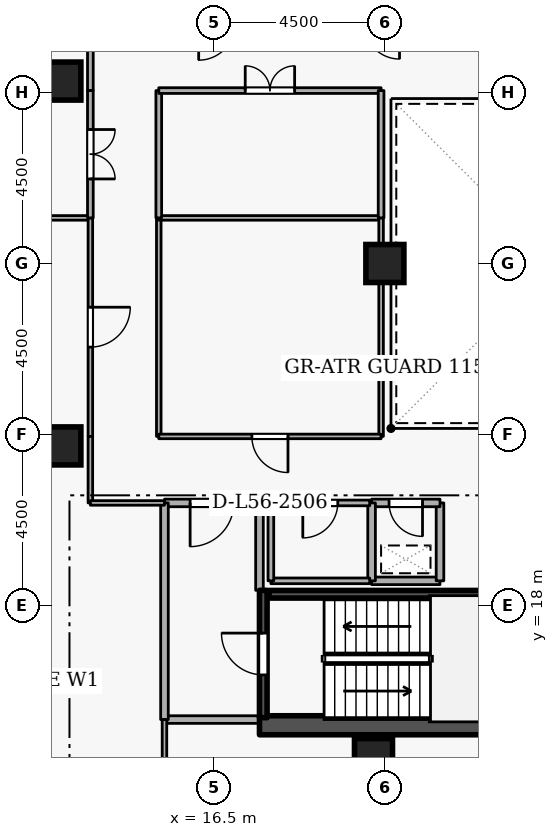
"""IFC4 building model, lengths in metres.
Left out: names, types, materials, properties, quantities, classifications, styles, units other than length and angle.
Written with IfcOpenShell. Run it as: python <this file> out.ifc"""

import sys

from ifc_helpers import new_model, si_unit, direction, frame, frame_2d, origin, origin_2d, place, context, subcontext, project, spatial, rectangle, extrude, element, fill, save


model = new_model("IFC4")
c1 = context("Model", 3, precision=1e-05, world=origin(), true_north=direction((0.0, 1.0)))
c2 = subcontext(c1, "Body", "Model", "MODEL_VIEW")
j1 = project(units=[si_unit("LENGTHUNIT", "METRE"), si_unit("PLANEANGLEUNIT", "RADIAN")], contexts=[c1])
p1 = place(None, origin())
s1 = spatial("IfcSite", under=j1, at=p1, CompositionType="ELEMENT")
p2 = place(p1, origin())
s2 = spatial("IfcBuilding", under=s1, at=p2, CompositionType="ELEMENT")
p3 = place(p2, frame((0.0, 0.0, 210.9)))
s3 = spatial("IfcBuildingStorey", under=s2, at=p3, CompositionType="ELEMENT", Elevation=210.9)
p4 = place(p3, frame((17.7, 14.85, 0.0), z_axis=(0.0, 0.0, 1.0), x_axis=(1.0, 0.0, 0.0)))
e1 = element("IfcWall", 1, at=p4, inside=s3, PredefinedType="SHEAR", context=c2, shape_type="SweptSolid", body=[
    extrude(rectangle(XDim=15.6, YDim=0.5, at=frame_2d((7.8, 0.0))), origin(), (0.0, 0.0, 1.0), 3.6),
])
for number, where, z_axis, x_axis in (
    (2, (12.5, 22.2, 0.0), (0.0, 0.0, 1.0), (1.0, 0.0, 0.0)),
    (3, (12.5, 31.8, 0.0), (0.0, 0.0, 1.0), (1.0, 0.0, 0.0)),
    (4, (20.7, 14.0, 0.0), (0.0, 0.0, 1.0), (1.0, 0.0, 0.0)),
    (5, (21.0, 27.0, 0.0), (0.0, 0.0, 1.0), (1.0, 0.0, 0.0)),
):
    element("IfcColumn", number, at=place(p3, frame(where, z_axis=z_axis, x_axis=x_axis)), inside=s3, PredefinedType="COLUMN", context=c2, shape_type="SweptSolid", body=[
        extrude(rectangle(XDim=1.0, YDim=1.0, at=origin_2d()), origin(), (0.0, 0.0, 1.0), 3.6),
    ])
p5 = place(p3, frame((17.8, 15.05, 0.0), z_axis=(0.0, 0.0, 1.0), x_axis=(0.0, 1.0, 0.0)))
e6 = element("IfcWall", 6, at=p5, inside=s3, PredefinedType="SHEAR", context=c2, shape_type="SweptSolid", body=[
    extrude(rectangle(XDim=3.35, YDim=0.2, at=frame_2d((1.675, 0.0))), origin(), (0.0, 0.0, 1.0), 3.6),
])
p6 = place(p5, frame((1.125, 0.0, 0.0)))
e7 = element("IfcOpeningElement", 7, at=p6, cuts=e6, PredefinedType="OPENING", context=c2, shape_type="SweptSolid", body=[
    extrude(rectangle(XDim=1.1, YDim=2.1, at=frame_2d((0.55, 1.05))), frame((0.0, 0.11, 0.0), z_axis=(0.0, -1.0, 0.0), x_axis=(1.0, 0.0, 0.0)), (0.0, 0.0, 1.0), 0.22),
])
p7 = place(p3, frame((25.05, 18.297, 0.0), z_axis=(0.0, 0.0, 1.0), x_axis=(-1.0, 0.0, 0.0)))
e8 = element("IfcWall", 8, at=p7, inside=s3, PredefinedType="SHEAR", context=c2, shape_type="SweptSolid", body=[
    extrude(rectangle(XDim=7.1, YDim=0.2, at=frame_2d((3.55, 0.0))), origin(), (0.0, 0.0, 1.0), 3.6),
])
p8 = place(p3, frame((15.2, 15.0, 0.0), z_axis=(0.0, 0.0, 1.0), x_axis=(1.0, 0.0, 0.0)))
e9 = element("IfcWall", 9, at=p8, inside=s3, PredefinedType="STANDARD", context=c2, shape_type="SweptSolid", body=[
    extrude(rectangle(XDim=2.5, YDim=0.2, at=frame_2d((1.25, 0.0))), origin(), (0.0, 0.0, 1.0), 3.34),
])
p9 = place(p3, frame((17.7, 18.4, 0.0), z_axis=(0.0, 0.0, 1.0), x_axis=(0.0, 1.0, 0.0)))
e10 = element("IfcWall", 10, at=p9, inside=s3, PredefinedType="STANDARD", context=c2, shape_type="SweptSolid", body=[
    extrude(rectangle(XDim=2.3, YDim=0.2, at=frame_2d((1.15, 0.0))), origin(), (0.0, 0.0, 1.0), 2.545),
])
p10 = place(p3, frame((17.7, 20.7, 0.0), z_axis=(0.0, 0.0, 1.0), x_axis=(-1.0, 0.0, 0.0)))
e11 = element("IfcWall", 11, at=p10, inside=s3, PredefinedType="STANDARD", context=c2, shape_type="SweptSolid", body=[
    extrude(rectangle(XDim=2.5, YDim=0.2, at=frame_2d((1.25, 0.0))), origin(), (0.0, 0.0, 1.0), 3.34),
])
p11 = place(p10, frame((0.675, 0.0, 0.0)))
e12 = element("IfcOpeningElement", 12, at=p11, cuts=e11, PredefinedType="OPENING", context=c2, shape_type="SweptSolid", body=[
    extrude(rectangle(XDim=1.15, YDim=2.1, at=frame_2d((0.575, 1.05))), frame((0.0, 0.11, 0.0), z_axis=(0.0, -1.0, 0.0), x_axis=(1.0, 0.0, 0.0)), (0.0, 0.0, 1.0), 0.22),
])
p12 = place(p3, frame((15.2, 20.7, 0.0), z_axis=(0.0, 0.0, 1.0), x_axis=(0.0, -1.0, 0.0)))
e13 = element("IfcWall", 13, at=p12, inside=s3, PredefinedType="STANDARD", context=c2, shape_type="SweptSolid", body=[
    extrude(rectangle(XDim=5.7, YDim=0.2, at=frame_2d((2.85, 0.0))), origin(), (0.0, 0.0, 1.0), 3.34),
])
p13 = place(p3, frame((20.65, 18.65, 0.0), z_axis=(0.0, 0.0, 1.0), x_axis=(1.0, 0.0, 0.0)))
e14 = element("IfcWall", 14, at=p13, inside=s3, PredefinedType="STANDARD", context=c2, shape_type="SweptSolid", body=[
    extrude(rectangle(XDim=1.8, YDim=0.2, at=frame_2d((0.9, 0.0))), origin(), (0.0, 0.0, 1.0), 3.34),
])
p14 = place(p3, frame((22.45, 18.65, 0.0), z_axis=(0.0, 0.0, 1.0), x_axis=(0.0, 1.0, 0.0)))
e15 = element("IfcWall", 15, at=p14, inside=s3, PredefinedType="STANDARD", context=c2, shape_type="SweptSolid", body=[
    extrude(rectangle(XDim=2.05, YDim=0.2, at=frame_2d((1.025, 0.0))), origin(), (0.0, 0.0, 1.0), 3.34),
])
p15 = place(p3, frame((22.45, 20.7, 0.0), z_axis=(0.0, 0.0, 1.0), x_axis=(-1.0, 0.0, 0.0)))
e16 = element("IfcWall", 16, at=p15, inside=s3, PredefinedType="STANDARD", context=c2, shape_type="SweptSolid", body=[
    extrude(rectangle(XDim=1.8, YDim=0.2, at=frame_2d((0.9, 0.0))), origin(), (0.0, 0.0, 1.0), 3.34),
])
p16 = place(p15, frame((0.46, 0.0, 0.0)))
e17 = element("IfcOpeningElement", 17, at=p16, cuts=e16, PredefinedType="OPENING", context=c2, shape_type="SweptSolid", body=[
    extrude(rectangle(XDim=0.88, YDim=2.04, at=frame_2d((0.44, 1.02))), frame((0.0, 0.11, 0.0), z_axis=(0.0, -1.0, 0.0), x_axis=(1.0, 0.0, 0.0)), (0.0, 0.0, 1.0), 0.22),
])
p17 = place(p3, frame((20.65, 20.7, 0.0), z_axis=(0.0, 0.0, 1.0), x_axis=(0.0, -1.0, 0.0)))
e18 = element("IfcWall", 18, at=p17, inside=s3, PredefinedType="STANDARD", context=c2, shape_type="SweptSolid", body=[
    extrude(rectangle(XDim=2.05, YDim=0.2, at=frame_2d((1.025, 0.0))), origin(), (0.0, 0.0, 1.0), 3.34),
])
p18 = place(p3, frame((18.0, 18.65, 0.0), z_axis=(0.0, 0.0, 1.0), x_axis=(1.0, 0.0, 0.0)))
e19 = element("IfcWall", 19, at=p18, inside=s3, PredefinedType="PARTITIONING", context=c2, shape_type="SweptSolid", body=[
    extrude(rectangle(XDim=2.6, YDim=0.15, at=frame_2d((1.3, 0.0))), origin(), (0.0, 0.0, 1.0), 3.34),
])
p19 = place(p3, frame((20.6, 20.7, 0.0), z_axis=(0.0, 0.0, 1.0), x_axis=(-1.0, 0.0, 0.0)))
e20 = element("IfcWall", 20, at=p19, inside=s3, PredefinedType="PARTITIONING", context=c2, shape_type="SweptSolid", body=[
    extrude(rectangle(XDim=2.6, YDim=0.15, at=frame_2d((1.3, 0.0))), origin(), (0.0, 0.0, 1.0), 3.34),
])
p20 = place(p19, frame((0.84, 0.0, 0.0)))
e21 = element("IfcOpeningElement", 21, at=p20, cuts=e20, PredefinedType="OPENING", context=c2, shape_type="SweptSolid", body=[
    extrude(rectangle(XDim=0.92, YDim=2.08, at=frame_2d((0.46, 1.04))), frame((0.0, 0.085, 0.0), z_axis=(0.0, -1.0, 0.0), x_axis=(1.0, 0.0, 0.0)), (0.0, 0.0, 1.0), 0.17),
])
p21 = place(p3, frame((18.0, 20.7, 0.0), z_axis=(0.0, 0.0, 1.0), x_axis=(0.0, -1.0, 0.0)))
e22 = element("IfcWall", 22, at=p21, inside=s3, PredefinedType="PARTITIONING", context=c2, shape_type="SweptSolid", body=[
    extrude(rectangle(XDim=2.05, YDim=0.15, at=frame_2d((1.025, 0.0))), origin(), (0.0, 0.0, 1.0), 2.545),
])
p22 = place(p3, frame((1.78, 28.2, 0.0), z_axis=(0.0, 0.0, 1.0), x_axis=(1.0, 0.0, 0.0)))
e23 = element("IfcWall", 23, at=p22, inside=s3, PredefinedType="PARTITIONING", context=c2, shape_type="SweptSolid", body=[
    extrude(rectangle(XDim=11.47, YDim=0.12, at=frame_2d((5.735, 0.0))), origin(), (0.0, 0.0, 1.0), 3.34),
])
p23 = place(p3, frame((13.25, 28.2, 0.0), z_axis=(0.0, 0.0, 1.0), x_axis=(0.0, -1.0, 0.0)))
e24 = element("IfcWall", 24, at=p23, inside=s3, PredefinedType="PARTITIONING", context=c2, shape_type="SweptSolid", body=[
    extrude(rectangle(XDim=5.75, YDim=0.12, at=frame_2d((2.875, 0.0))), origin(), (0.0, 0.0, 1.0), 3.34),
])
p24 = place(p23, frame((2.35, 0.0, 0.0)))
e25 = element("IfcOpeningElement", 25, at=p24, cuts=e24, PredefinedType="OPENING", context=c2, shape_type="SweptSolid", body=[
    extrude(rectangle(XDim=1.05, YDim=2.1, at=frame_2d((0.525, 1.05))), frame((0.0, 0.07, 0.0), z_axis=(0.0, -1.0, 0.0), x_axis=(1.0, 0.0, 0.0)), (0.0, 0.0, 1.0), 0.14),
])
p25 = place(p3, frame((13.25, 22.45, 0.0), z_axis=(0.0, 0.0, 1.0), x_axis=(0.0, -1.0, 0.0)))
e26 = element("IfcWall", 26, at=p25, inside=s3, PredefinedType="PARTITIONING", context=c2, shape_type="SweptSolid", body=[
    extrude(rectangle(XDim=1.75, YDim=0.12, at=frame_2d((0.875, 0.0))), origin(), (0.0, 0.0, 1.0), 3.34),
])
p26 = place(p3, frame((13.25, 20.7, 0.0), z_axis=(0.0, 0.0, 1.0), x_axis=(1.0, 0.0, 0.0)))
e27 = element("IfcWall", 27, at=p26, inside=s3, PredefinedType="PARTITIONING", context=c2, shape_type="SweptSolid", body=[
    extrude(rectangle(XDim=1.95, YDim=0.12, at=frame_2d((0.975, 0.0))), origin(), (0.0, 0.0, 1.0), 3.34),
])
p27 = place(p3, frame((15.2, 15.0, 0.0), z_axis=(0.0, 0.0, 1.0), x_axis=(0.0, -1.0, 0.0)))
e28 = element("IfcWall", 28, at=p27, inside=s3, PredefinedType="PARTITIONING", context=c2, shape_type="SweptSolid", body=[
    extrude(rectangle(XDim=5.72, YDim=0.12, at=frame_2d((2.86, 0.0))), origin(), (0.0, 0.0, 1.0), 3.34),
])
p28 = place(p3, frame((13.25, 33.3, 0.0), z_axis=(0.0, 0.0, 1.0), x_axis=(0.0, -1.0, 0.0)))
e29 = element("IfcWall", 29, at=p28, inside=s3, PredefinedType="PARTITIONING", context=c2, shape_type="SweptSolid", body=[
    extrude(rectangle(XDim=1.75, YDim=0.15, at=frame_2d((0.875, 0.0))), origin(), (0.0, 0.0, 1.0), 3.34),
])
p29 = place(p3, frame((13.25, 31.55, 0.0), z_axis=(0.0, 0.0, 1.0), x_axis=(0.0, -1.0, 0.0)))
e30 = element("IfcWall", 30, at=p29, inside=s3, PredefinedType="PARTITIONING", context=c2, shape_type="SweptSolid", body=[
    extrude(rectangle(XDim=3.35, YDim=0.15, at=frame_2d((1.675, 0.0))), origin(), (0.0, 0.0, 1.0), 3.34),
])
p30 = place(p29, frame((1.025, 0.0, 0.0)))
e31 = element("IfcOpeningElement", 31, at=p30, cuts=e30, PredefinedType="OPENING", context=c2, shape_type="SweptSolid", body=[
    extrude(rectangle(XDim=1.3, YDim=2.12, at=frame_2d((0.65, 1.06))), frame((0.0, 0.085, 0.0), z_axis=(0.0, -1.0, 0.0), x_axis=(1.0, 0.0, 0.0)), (0.0, 0.0, 1.0), 0.17),
])
p31 = place(p3, frame((15.05, 22.45, 0.0), z_axis=(0.0, 0.0, 1.0), x_axis=(0.0, 1.0, 0.0)))
e32 = element("IfcWall", 32, at=p31, inside=s3, PredefinedType="PARTITIONING", context=c2, shape_type="SweptSolid", body=[
    extrude(rectangle(XDim=5.75, YDim=0.12, at=frame_2d((2.875, 0.0))), origin(), (0.0, 0.0, 1.0), 3.34),
])
p32 = place(p3, frame((15.05, 28.2, 0.0), z_axis=(0.0, 0.0, 1.0), x_axis=(1.0, 0.0, 0.0)))
e33 = element("IfcWall", 33, at=p32, inside=s3, PredefinedType="PARTITIONING", context=c2, shape_type="SweptSolid", body=[
    extrude(rectangle(XDim=5.85, YDim=0.12, at=frame_2d((2.925, 0.0))), origin(), (0.0, 0.0, 1.0), 3.34),
])
p33 = place(p3, frame((20.9, 28.2, 0.0), z_axis=(0.0, 0.0, 1.0), x_axis=(0.0, -1.0, 0.0)))
e34 = element("IfcWall", 34, at=p33, inside=s3, PredefinedType="PARTITIONING", context=c2, shape_type="SweptSolid", body=[
    extrude(rectangle(XDim=5.75, YDim=0.12, at=frame_2d((2.875, 0.0))), origin(), (0.0, 0.0, 1.0), 3.34),
])
p34 = place(p3, frame((20.9, 22.45, 0.0), z_axis=(0.0, 0.0, 1.0), x_axis=(-1.0, 0.0, 0.0)))
e35 = element("IfcWall", 35, at=p34, inside=s3, PredefinedType="PARTITIONING", context=c2, shape_type="SweptSolid", body=[
    extrude(rectangle(XDim=5.85, YDim=0.12, at=frame_2d((2.925, 0.0))), origin(), (0.0, 0.0, 1.0), 3.34),
])
p35 = place(p34, frame((2.45, 0.0, 0.0)))
e36 = element("IfcOpeningElement", 36, at=p35, cuts=e35, PredefinedType="OPENING", context=c2, shape_type="SweptSolid", body=[
    extrude(rectangle(XDim=0.95, YDim=2.1, at=frame_2d((0.475, 1.05))), frame((0.0, 0.07, 0.0), z_axis=(0.0, -1.0, 0.0), x_axis=(1.0, 0.0, 0.0)), (0.0, 0.0, 1.0), 0.14),
])
p36 = place(p3, frame((15.05, 28.2, 0.0), z_axis=(0.0, 0.0, 1.0), x_axis=(0.0, 1.0, 0.0)))
e37 = element("IfcWall", 37, at=p36, inside=s3, PredefinedType="PARTITIONING", context=c2, shape_type="SweptSolid", body=[
    extrude(rectangle(XDim=3.35, YDim=0.15, at=frame_2d((1.675, 0.0))), origin(), (0.0, 0.0, 1.0), 3.34),
])
p37 = place(p3, frame((15.05, 31.55, 0.0), z_axis=(0.0, 0.0, 1.0), x_axis=(1.0, 0.0, 0.0)))
e38 = element("IfcWall", 38, at=p37, inside=s3, PredefinedType="PARTITIONING", context=c2, shape_type="SweptSolid", body=[
    extrude(rectangle(XDim=5.85, YDim=0.15, at=frame_2d((2.925, 0.0))), origin(), (0.0, 0.0, 1.0), 3.34),
])
p38 = place(p37, frame((2.275, 0.0, 0.0)))
e39 = element("IfcOpeningElement", 39, at=p38, cuts=e38, PredefinedType="OPENING", context=c2, shape_type="SweptSolid", body=[
    extrude(rectangle(XDim=1.3, YDim=2.12, at=frame_2d((0.65, 1.06))), frame((0.0, 0.085, 0.0), z_axis=(0.0, -1.0, 0.0), x_axis=(1.0, 0.0, 0.0)), (0.0, 0.0, 1.0), 0.17),
])
p39 = place(p3, frame((20.9, 31.55, 0.0), z_axis=(0.0, 0.0, 1.0), x_axis=(0.0, -1.0, 0.0)))
e40 = element("IfcWall", 40, at=p39, inside=s3, PredefinedType="PARTITIONING", context=c2, shape_type="SweptSolid", body=[
    extrude(rectangle(XDim=3.35, YDim=0.15, at=frame_2d((1.675, 0.0))), origin(), (0.0, 0.0, 1.0), 3.34),
])
p40 = place(p6, origin())
e41 = element("IfcDoor", 41, at=p40, inside=s3, OperationType="SINGLE_SWING_RIGHT", PredefinedType="DOOR", context=c2, shape_type="SweptSolid", body=[
    extrude(rectangle(XDim=1.1, YDim=2.1, at=frame_2d((0.55, 1.05))), frame((0.0, 0.025, 0.0), z_axis=(0.0, -1.0, 0.0), x_axis=(1.0, 0.0, 0.0)), (0.0, 0.0, 1.0), 0.05),
])
fill(e7, e41)
p41 = place(p11, origin())
e42 = element("IfcDoor", 42, at=p41, inside=s3, OperationType="SINGLE_SWING_RIGHT", PredefinedType="DOOR", context=c2, shape_type="SweptSolid", body=[
    extrude(rectangle(XDim=1.15, YDim=2.1, at=frame_2d((0.575, 1.05))), frame((0.0, 0.025, 0.0), z_axis=(0.0, -1.0, 0.0), x_axis=(1.0, 0.0, 0.0)), (0.0, 0.0, 1.0), 0.05),
])
fill(e12, e42)
p42 = place(p16, origin())
e43 = element("IfcDoor", 43, at=p42, inside=s3, OperationType="SINGLE_SWING_LEFT", PredefinedType="DOOR", context=c2, shape_type="SweptSolid", body=[
    extrude(rectangle(XDim=0.88, YDim=2.04, at=frame_2d((0.44, 1.02))), frame((0.0, 0.025, 0.0), z_axis=(0.0, -1.0, 0.0), x_axis=(1.0, 0.0, 0.0)), (0.0, 0.0, 1.0), 0.05),
])
fill(e17, e43)
p43 = place(p20, origin())
e44 = element("IfcDoor", 44, at=p43, inside=s3, OperationType="SINGLE_SWING_RIGHT", PredefinedType="DOOR", context=c2, shape_type="SweptSolid", body=[
    extrude(rectangle(XDim=0.92, YDim=2.08, at=frame_2d((0.46, 1.04))), frame((0.0, 0.025, 0.0), z_axis=(0.0, -1.0, 0.0), x_axis=(1.0, 0.0, 0.0)), (0.0, 0.0, 1.0), 0.05),
])
fill(e21, e44)
p44 = place(p24, origin())
e45 = element("IfcDoor", 45, at=p44, inside=s3, OperationType="SINGLE_SWING_LEFT", PredefinedType="DOOR", context=c2, shape_type="SweptSolid", body=[
    extrude(rectangle(XDim=1.05, YDim=2.1, at=frame_2d((0.525, 1.05))), frame((0.0, 0.025, 0.0), z_axis=(0.0, -1.0, 0.0), x_axis=(1.0, 0.0, 0.0)), (0.0, 0.0, 1.0), 0.05),
])
fill(e25, e45)
p45 = place(p30, origin())
e46 = element("IfcDoor", 46, at=p45, inside=s3, OperationType="DOUBLE_DOOR_SINGLE_SWING", PredefinedType="DOOR", context=c2, shape_type="SweptSolid", body=[
    extrude(rectangle(XDim=1.3, YDim=2.12, at=frame_2d((0.65, 1.06))), frame((0.0, 0.025, 0.0), z_axis=(0.0, -1.0, 0.0), x_axis=(1.0, 0.0, 0.0)), (0.0, 0.0, 1.0), 0.05),
])
fill(e31, e46)
p46 = place(p35, origin())
e47 = element("IfcDoor", 47, at=p46, inside=s3, OperationType="SINGLE_SWING_LEFT", PredefinedType="DOOR", context=c2, shape_type="SweptSolid", body=[
    extrude(rectangle(XDim=0.95, YDim=2.1, at=frame_2d((0.475, 1.05))), frame((0.0, 0.025, 0.0), z_axis=(0.0, -1.0, 0.0), x_axis=(1.0, 0.0, 0.0)), (0.0, 0.0, 1.0), 0.05),
])
fill(e36, e47)
p47 = place(p38, origin())
e48 = element("IfcDoor", 48, at=p47, inside=s3, OperationType="DOUBLE_DOOR_SINGLE_SWING", PredefinedType="DOOR", context=c2, shape_type="SweptSolid", body=[
    extrude(rectangle(XDim=1.3, YDim=2.12, at=frame_2d((0.65, 1.06))), frame((0.0, 0.025, 0.0), z_axis=(0.0, -1.0, 0.0), x_axis=(1.0, 0.0, 0.0)), (0.0, 0.0, 1.0), 0.05),
])
fill(e39, e48)
save(model, sys.argv[1])
